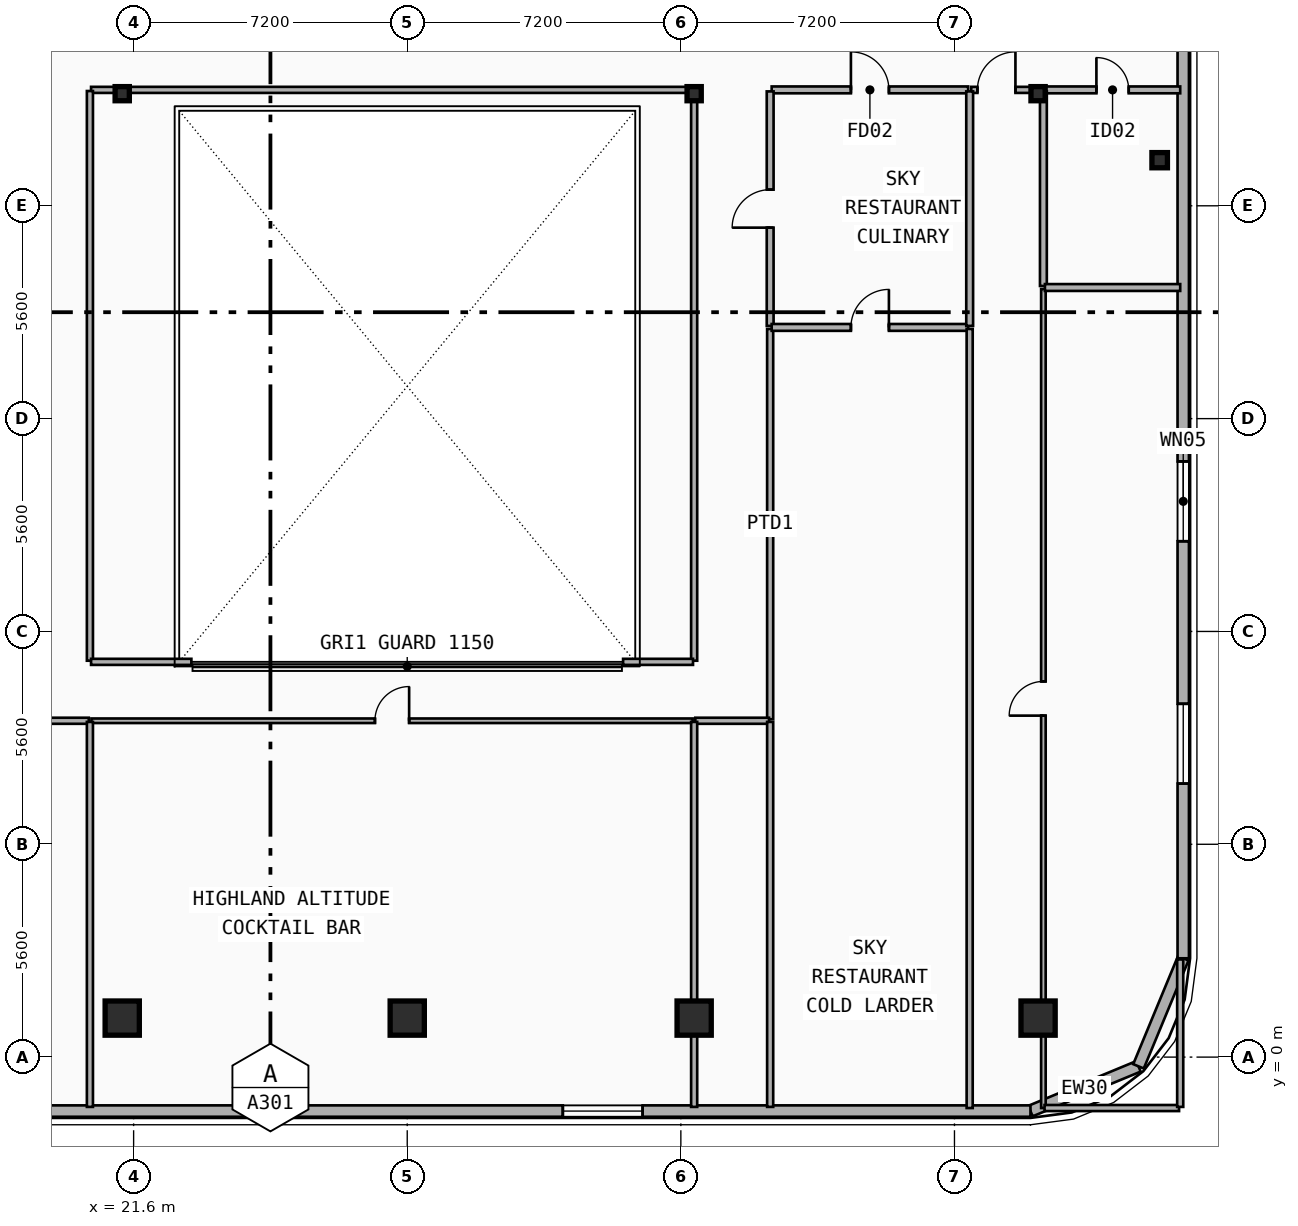
"""IFC4 building model, lengths in metres.
Left out: names, types, materials, properties, quantities, classifications, styles, units other than length and angle.
Written with IfcOpenShell. Run it as: python <this file> out.ifc"""

import sys

from ifc_helpers import new_model, si_unit, direction, frame, frame_2d, origin, origin_2d, place, context, subcontext, project, spatial, rectangle, i_section, extrude, element, fill, save


model = new_model("IFC4")
c1 = context("Model", 3, precision=1e-05, world=origin(), true_north=direction((0.0, 1.0)))
c2 = subcontext(c1, "Body", "Model", "MODEL_VIEW")
j1 = project(units=[si_unit("LENGTHUNIT", "METRE"), si_unit("PLANEANGLEUNIT", "RADIAN")], contexts=[c1])
p1 = place(None, origin())
s1 = spatial("IfcSite", under=j1, at=p1, CompositionType="ELEMENT")
p2 = place(p1, origin())
s2 = spatial("IfcBuilding", under=s1, at=p2, CompositionType="ELEMENT")
p3 = place(p2, frame((0.0, 0.0, 276.9)))
s3 = spatial("IfcBuildingStorey", under=s2, at=p3, CompositionType="ELEMENT", Elevation=276.9)
for number, where, z_axis, x_axis in (
    (1, (21.3, 25.35, 0.0), (0.0, 0.0, 1.0), (1.0, 0.0, 0.0)),
    (2, (36.35, 25.35, 0.0), (0.0, 0.0, 1.0), (1.0, 0.0, 0.0)),
    (3, (45.4, 25.35, 0.0), (0.0, 0.0, 1.0), (1.0, 0.0, 0.0)),
):
    element("IfcColumn", number, at=place(p3, frame(where, z_axis=z_axis, x_axis=x_axis)), inside=s3, PredefinedType="COLUMN", context=c2, shape_type="SweptSolid", body=[
        extrude(i_section(OverallWidth=0.374, OverallDepth=0.372, WebThickness=0.017, FlangeThickness=0.027, FilletRadius=0.015, at=origin_2d()), origin(), (0.0, 0.0, 1.0), 3.7),
    ])
for number, where, z_axis, x_axis in (
    (4, (21.3, 1.135, 0.0), (0.0, -0.09, 0.996), (1.0, 0.0, 0.0)),
    (5, (28.8, 1.135, 0.0), (0.0, -0.09, 0.996), (1.0, 0.0, 0.0)),
    (6, (36.35, 1.135, 0.0), (0.0, -0.09, 0.996), (1.0, 0.0, 0.0)),
    (7, (45.4, 1.135, 0.0), (0.0, -0.09, 0.996), (1.0, 0.0, 0.0)),
):
    element("IfcColumn", number, at=place(p3, frame(where, z_axis=z_axis, x_axis=x_axis)), inside=s3, PredefinedType="COLUMN", context=c2, shape_type="SweptSolid", body=[
        extrude(rectangle(XDim=0.9, YDim=0.9, at=origin_2d()), origin(), (0.0, 0.0, 1.0), 3.715),
    ])
p4 = place(p3, frame((48.6, 23.6, 0.0), z_axis=(0.0, 0.0, 1.0), x_axis=(1.0, 0.0, 0.0)))
e8 = element("IfcColumn", 8, at=p4, inside=s3, PredefinedType="COLUMN", context=c2, shape_type="SweptSolid", body=[
    extrude(i_section(OverallWidth=0.408, OverallDepth=0.4, WebThickness=0.025, FlangeThickness=0.039, FilletRadius=0.015, at=origin_2d()), origin(), (0.0, 0.0, 1.0), 3.7),
])
p5 = place(p3, frame((48.042, -0.243, 0.0), z_axis=(0.0, 0.0, 1.0), x_axis=(-0.92389884758, -0.382636798336, 0.0)))
e9 = element("IfcWall", 9, at=p5, inside=s3, PredefinedType="SOLIDWALL", context=c2, shape_type="SweptSolid", body=[
    extrude(rectangle(XDim=3.077, YDim=0.3, at=frame_2d((1.538, 0.0))), origin(), (0.0, 0.0, 1.0), 3.38),
])
p6 = place(p3, frame((49.22, 2.6, 0.0), z_axis=(0.0, 0.0, 1.0), x_axis=(-0.382676475685, -0.923882414032, 0.0)))
e10 = element("IfcWall", 10, at=p6, inside=s3, PredefinedType="SOLIDWALL", context=c2, shape_type="SweptSolid", body=[
    extrude(rectangle(XDim=3.077, YDim=0.3, at=frame_2d((1.539, 0.0))), origin(), (0.0, 0.0, 1.0), 3.38),
])
p7 = place(p3, frame((49.22, 36.8, 0.0), z_axis=(0.0, 0.0, 1.0), x_axis=(0.0, -1.0, 0.0)))
e11 = element("IfcWall", 11, at=p7, inside=s3, PredefinedType="SOLIDWALL", context=c2, shape_type="SweptSolid", body=[
    extrude(rectangle(XDim=34.2, YDim=0.3, at=frame_2d((17.1, 0.0))), origin(), (0.0, 0.0, 1.0), 3.38),
])
p8 = place(p7, frame((21.127, 0.0, 0.75)))
e12 = element("IfcOpeningElement", 12, at=p8, cuts=e11, PredefinedType="OPENING", context=c2, shape_type="SweptSolid", body=[
    extrude(rectangle(XDim=2.1, YDim=2.1, at=frame_2d((1.05, 1.05))), frame((0.0, 0.16, 0.0), z_axis=(0.0, -1.0, 0.0), x_axis=(1.0, 0.0, 0.0)), (0.0, 0.0, 1.0), 0.32),
])
p9 = place(p7, frame((27.503, 0.0, 0.75)))
e13 = element("IfcOpeningElement", 13, at=p9, cuts=e11, PredefinedType="OPENING", context=c2, shape_type="SweptSolid", body=[
    extrude(rectangle(XDim=2.1, YDim=2.1, at=frame_2d((1.05, 1.05))), frame((0.0, 0.16, 0.0), z_axis=(0.0, -1.0, 0.0), x_axis=(1.0, 0.0, 0.0)), (0.0, 0.0, 1.0), 0.32),
])
p10 = place(p3, frame((45.2, -1.42, 0.0), z_axis=(0.0, 0.0, 1.0), x_axis=(-1.0, 0.0, 0.0)))
e14 = element("IfcWall", 14, at=p10, inside=s3, PredefinedType="SOLIDWALL", context=c2, shape_type="SweptSolid", body=[
    extrude(rectangle(XDim=32.8, YDim=0.3, at=frame_2d((16.4, 0.0))), origin(), (0.0, 0.0, 1.0), 3.38),
])
p11 = place(p10, frame((30.68, 0.0, 0.34)))
e15 = element("IfcOpeningElement", 15, at=p11, cuts=e14, PredefinedType="OPENING", context=c2, shape_type="SweptSolid", body=[
    extrude(rectangle(XDim=1.8, YDim=1.8, at=frame_2d((0.9, 0.9))), frame((0.0, 0.16, 0.0), z_axis=(0.0, -1.0, 0.0), x_axis=(1.0, 0.0, 0.0)), (0.0, 0.0, 1.0), 0.32),
])
p12 = place(p10, frame((10.206, 0.0, 0.75)))
e16 = element("IfcOpeningElement", 16, at=p12, cuts=e14, PredefinedType="OPENING", context=c2, shape_type="SweptSolid", body=[
    extrude(rectangle(XDim=2.1, YDim=2.1, at=frame_2d((1.05, 1.05))), frame((0.0, 0.16, 0.0), z_axis=(0.0, -1.0, 0.0), x_axis=(1.0, 0.0, 0.0)), (0.0, 0.0, 1.0), 0.32),
])
p13 = place(p3, frame((38.39, 25.45, 0.0), z_axis=(0.0, 0.0, 1.0), x_axis=(1.0, 0.0, 0.0)))
e17 = element("IfcWall", 17, at=p13, inside=s3, PredefinedType="PLUMBINGWALL", context=c2, shape_type="SweptSolid", body=[
    extrude(rectangle(XDim=5.17, YDim=0.18, at=frame_2d((2.585, 0.0))), origin(), (0.0, 0.0, 1.0), 3.38),
])
p14 = place(p13, frame((2.085, 0.0, 0.0)))
e18 = element("IfcOpeningElement", 18, at=p14, cuts=e17, PredefinedType="OPENING", context=c2, shape_type="SweptSolid", body=[
    extrude(rectangle(XDim=1.0, YDim=2.15, at=frame_2d((0.5, 1.075))), frame((0.0, 0.1, 0.0), z_axis=(0.0, -1.0, 0.0), x_axis=(1.0, 0.0, 0.0)), (0.0, 0.0, 1.0), 0.2),
])
p15 = place(p3, frame((43.64, 25.45, 0.0), z_axis=(0.0, 0.0, 1.0), x_axis=(1.0, 0.0, 0.0)))
e19 = element("IfcWall", 19, at=p15, inside=s3, PredefinedType="PARTITIONING", context=c2, shape_type="SweptSolid", body=[
    extrude(rectangle(XDim=1.86, YDim=0.16, at=frame_2d((0.93, 0.0))), origin(), (0.0, 0.0, 1.0), 2.66),
])
p16 = place(p15, frame((0.164, 0.0, 0.0)))
e20 = element("IfcOpeningElement", 20, at=p16, cuts=e19, PredefinedType="OPENING", context=c2, shape_type="SweptSolid", body=[
    extrude(rectangle(XDim=1.0, YDim=2.15, at=frame_2d((0.5, 1.075))), frame((0.0, 0.09, 0.0), z_axis=(0.0, -1.0, 0.0), x_axis=(1.0, 0.0, 0.0)), (0.0, 0.0, 1.0), 0.18),
])
p17 = place(p3, frame((45.58, 25.45, 0.0), z_axis=(0.0, 0.0, 1.0), x_axis=(1.0, 0.0, 0.0)))
e21 = element("IfcWall", 21, at=p17, inside=s3, PredefinedType="PLUMBINGWALL", context=c2, shape_type="SweptSolid", body=[
    extrude(rectangle(XDim=3.56, YDim=0.18, at=frame_2d((1.78, 0.0))), origin(), (0.0, 0.0, 1.0), 2.66),
])
p18 = place(p17, frame((1.355, 0.0, 0.0)))
e22 = element("IfcOpeningElement", 22, at=p18, cuts=e21, PredefinedType="OPENING", context=c2, shape_type="SweptSolid", body=[
    extrude(rectangle(XDim=0.85, YDim=2.1, at=frame_2d((0.425, 1.05))), frame((0.0, 0.1, 0.0), z_axis=(0.0, -1.0, 0.0), x_axis=(1.0, 0.0, 0.0)), (0.0, 0.0, 1.0), 0.2),
])
p19 = place(p3, frame((38.35, 19.24, 0.0), z_axis=(0.0, 0.0, 1.0), x_axis=(0.0, 1.0, 0.0)))
e23 = element("IfcWall", 23, at=p19, inside=s3, PredefinedType="PLUMBINGWALL", context=c2, shape_type="SweptSolid", body=[
    extrude(rectangle(XDim=6.17, YDim=0.18, at=frame_2d((3.085, 0.0))), origin(), (0.0, 0.0, 1.0), 3.01),
])
p20 = place(p19, frame((2.585, 0.0, 0.0)))
e24 = element("IfcOpeningElement", 24, at=p20, cuts=e23, PredefinedType="OPENING", context=c2, shape_type="SweptSolid", body=[
    extrude(rectangle(XDim=1.0, YDim=2.15, at=frame_2d((0.5, 1.075))), frame((0.0, 0.1, 0.0), z_axis=(0.0, -1.0, 0.0), x_axis=(1.0, 0.0, 0.0)), (0.0, 0.0, 1.0), 0.2),
])
p21 = place(p3, frame((38.35, 8.89, 0.0), z_axis=(0.0, 0.0, 1.0), x_axis=(0.0, 1.0, 0.0)))
e25 = element("IfcWall", 25, at=p21, inside=s3, PredefinedType="PARTITIONING", context=c2, shape_type="SweptSolid", body=[
    extrude(rectangle(XDim=10.27, YDim=0.16, at=frame_2d((5.135, 0.0))), origin(), (0.0, 0.0, 1.0), 2.86),
])
p22 = place(p3, frame((20.49, 8.85, 0.0), z_axis=(0.0, 0.0, 1.0), x_axis=(1.0, 0.0, 0.0)))
e26 = element("IfcWall", 26, at=p22, inside=s3, PredefinedType="PARTITIONING", context=c2, shape_type="SweptSolid", body=[
    extrude(rectangle(XDim=15.82, YDim=0.12, at=frame_2d((7.91, 0.0))), origin(), (0.0, 0.0, 1.0), 2.66),
])
p23 = place(p22, frame((7.46, 0.0, 0.0)))
e27 = element("IfcOpeningElement", 27, at=p23, cuts=e26, PredefinedType="OPENING", context=c2, shape_type="SweptSolid", body=[
    extrude(rectangle(XDim=0.9, YDim=2.1, at=frame_2d((0.45, 1.05))), frame((0.0, 0.07, 0.0), z_axis=(0.0, -1.0, 0.0), x_axis=(1.0, 0.0, 0.0)), (0.0, 0.0, 1.0), 0.14),
])
p24 = place(p3, frame((38.39, 19.2, 0.0), z_axis=(0.0, 0.0, 1.0), x_axis=(1.0, 0.0, 0.0)))
e28 = element("IfcWall", 28, at=p24, inside=s3, PredefinedType="PLUMBINGWALL", context=c2, shape_type="SweptSolid", body=[
    extrude(rectangle(XDim=5.17, YDim=0.18, at=frame_2d((2.585, 0.0))), origin(), (0.0, 0.0, 1.0), 3.38),
])
p25 = place(p24, frame((2.085, 0.0, 0.0)))
e29 = element("IfcOpeningElement", 29, at=p25, cuts=e28, PredefinedType="OPENING", context=c2, shape_type="SweptSolid", body=[
    extrude(rectangle(XDim=1.0, YDim=2.15, at=frame_2d((0.5, 1.075))), frame((0.0, 0.1, 0.0), z_axis=(0.0, -1.0, 0.0), x_axis=(1.0, 0.0, 0.0)), (0.0, 0.0, 1.0), 0.2),
])
p26 = place(p3, frame((43.6, 19.24, 0.0), z_axis=(0.0, 0.0, 1.0), x_axis=(0.0, 1.0, 0.0)))
e30 = element("IfcWall", 30, at=p26, inside=s3, PredefinedType="PLUMBINGWALL", context=c2, shape_type="SweptSolid", body=[
    extrude(rectangle(XDim=6.17, YDim=0.18, at=frame_2d((3.085, 0.0))), origin(), (0.0, 0.0, 1.0), 3.01),
])
p27 = place(p3, frame((43.6, -1.34, 0.0), z_axis=(0.0, 0.0, 1.0), x_axis=(0.0, 1.0, 0.0)))
e31 = element("IfcWall", 31, at=p27, inside=s3, PredefinedType="PARTITIONING", context=c2, shape_type="SweptSolid", body=[
    extrude(rectangle(XDim=20.5, YDim=0.16, at=frame_2d((10.25, 0.0))), origin(), (0.0, 0.0, 1.0), 2.86),
])
p28 = place(p3, frame((45.54, -1.34, 0.0), z_axis=(0.0, 0.0, 1.0), x_axis=(0.0, 1.0, 0.0)))
e32 = element("IfcWall", 32, at=p28, inside=s3, PredefinedType="PARTITIONING", context=c2, shape_type="SweptSolid", body=[
    extrude(rectangle(XDim=21.55, YDim=0.12, at=frame_2d((10.775, 0.0))), origin(), (0.0, 0.0, 1.0), 2.66),
])
p29 = place(p28, frame((10.325, 0.0, 0.0)))
e33 = element("IfcOpeningElement", 33, at=p29, cuts=e32, PredefinedType="OPENING", context=c2, shape_type="SweptSolid", body=[
    extrude(rectangle(XDim=0.9, YDim=2.1, at=frame_2d((0.45, 1.05))), frame((0.0, 0.07, 0.0), z_axis=(0.0, -1.0, 0.0), x_axis=(1.0, 0.0, 0.0)), (0.0, 0.0, 1.0), 0.14),
])
p30 = place(p3, frame((45.54, 20.29, 0.0), z_axis=(0.0, 0.0, 1.0), x_axis=(0.0, 1.0, 0.0)))
e34 = element("IfcWall", 34, at=p30, inside=s3, PredefinedType="PLUMBINGWALL", context=c2, shape_type="SweptSolid", body=[
    extrude(rectangle(XDim=5.12, YDim=0.18, at=frame_2d((2.56, 0.0))), origin(), (0.0, 0.0, 1.0), 2.66),
])
p31 = place(p3, frame((45.58, 20.25, 0.0), z_axis=(0.0, 0.0, 1.0), x_axis=(1.0, 0.0, 0.0)))
e35 = element("IfcWall", 35, at=p31, inside=s3, PredefinedType="PLUMBINGWALL", context=c2, shape_type="SweptSolid", body=[
    extrude(rectangle(XDim=3.56, YDim=0.18, at=frame_2d((1.78, 0.0))), origin(), (0.0, 0.0, 1.0), 2.66),
])
p32 = place(p3, frame((20.48, 25.45, 0.0), z_axis=(0.0, 0.0, 1.0), x_axis=(1.0, 0.0, 0.0)))
e36 = element("IfcWall", 36, at=p32, inside=s3, PredefinedType="PARTITIONING", context=c2, shape_type="SweptSolid", body=[
    extrude(rectangle(XDim=15.84, YDim=0.16, at=frame_2d((7.92, 0.0))), origin(), (0.0, 0.0, 1.0), 2.66),
])
p33 = place(p3, frame((18.88, 8.85, 0.0), z_axis=(0.0, 0.0, 1.0), x_axis=(1.0, 0.0, 0.0)))
e37 = element("IfcWall", 37, at=p33, inside=s3, PredefinedType="PARTITIONING", context=c2, shape_type="SweptSolid", body=[
    extrude(rectangle(XDim=1.54, YDim=0.16, at=frame_2d((0.77, 0.0))), origin(), (0.0, 0.0, 1.0), 3.38),
])
p34 = place(p3, frame((20.45, 10.43, 0.0), z_axis=(0.0, 0.0, 1.0), x_axis=(0.0, 1.0, 0.0)))
e38 = element("IfcWall", 38, at=p34, inside=s3, PredefinedType="PARTITIONING", context=c2, shape_type="SweptSolid", body=[
    extrude(rectangle(XDim=14.99, YDim=0.16, at=frame_2d((7.495, 0.0))), origin(), (0.0, 0.0, 1.0), 2.86),
])
p35 = place(p3, frame((36.38, 8.85, 0.0), z_axis=(0.0, 0.0, 1.0), x_axis=(1.0, 0.0, 0.0)))
e39 = element("IfcWall", 39, at=p35, inside=s3, PredefinedType="PARTITIONING", context=c2, shape_type="SweptSolid", body=[
    extrude(rectangle(XDim=1.94, YDim=0.16, at=frame_2d((0.97, 0.0))), origin(), (0.0, 0.0, 1.0), 2.66),
])
p36 = place(p3, frame((36.35, 10.43, 0.0), z_axis=(0.0, 0.0, 1.0), x_axis=(0.0, 1.0, 0.0)))
e40 = element("IfcWall", 40, at=p36, inside=s3, PredefinedType="PARTITIONING", context=c2, shape_type="SweptSolid", body=[
    extrude(rectangle(XDim=14.99, YDim=0.16, at=frame_2d((7.495, 0.0))), origin(), (0.0, 0.0, 1.0), 2.66),
])
p37 = place(p3, frame((20.48, 10.4, 0.0), z_axis=(0.0, 0.0, 1.0), x_axis=(1.0, 0.0, 0.0)))
e41 = element("IfcWall", 41, at=p37, inside=s3, PredefinedType="PARTITIONING", context=c2, shape_type="SweptSolid", body=[
    extrude(rectangle(XDim=2.64, YDim=0.16, at=frame_2d((1.32, 0.0))), origin(), (0.0, 0.0, 1.0), 2.66),
])
p38 = place(p3, frame((34.48, 10.4, 0.0), z_axis=(0.0, 0.0, 1.0), x_axis=(1.0, 0.0, 0.0)))
e42 = element("IfcWall", 42, at=p38, inside=s3, PredefinedType="PARTITIONING", context=c2, shape_type="SweptSolid", body=[
    extrude(rectangle(XDim=1.84, YDim=0.16, at=frame_2d((0.92, 0.0))), origin(), (0.0, 0.0, 1.0), 2.66),
])
p39 = place(p3, frame((20.45, -1.31, 0.0), z_axis=(0.0, 0.0, 1.0), x_axis=(0.0, 1.0, 0.0)))
e43 = element("IfcWall", 43, at=p39, inside=s3, PredefinedType="PARTITIONING", context=c2, shape_type="SweptSolid", body=[
    extrude(rectangle(XDim=10.13, YDim=0.16, at=frame_2d((5.065, 0.0))), origin(), (0.0, 0.0, 1.0), 3.01),
])
p40 = place(p3, frame((36.35, -1.31, 0.0), z_axis=(0.0, 0.0, 1.0), x_axis=(0.0, 1.0, 0.0)))
e44 = element("IfcWall", 44, at=p40, inside=s3, PredefinedType="PARTITIONING", context=c2, shape_type="SweptSolid", body=[
    extrude(rectangle(XDim=10.13, YDim=0.16, at=frame_2d((5.065, 0.0))), origin(), (0.0, 0.0, 1.0), 2.66),
])
p41 = place(p3, frame((38.35, -1.31, 0.0), z_axis=(0.0, 0.0, 1.0), x_axis=(0.0, 1.0, 0.0)))
e45 = element("IfcWall", 45, at=p41, inside=s3, PredefinedType="PARTITIONING", context=c2, shape_type="SweptSolid", body=[
    extrude(rectangle(XDim=10.13, YDim=0.16, at=frame_2d((5.065, 0.0))), origin(), (0.0, 0.0, 1.0), 3.01),
])
p42 = place(p3, frame((45.57, -1.34, 0.0), z_axis=(0.0, 0.0, 1.0), x_axis=(1.0, 0.0, 0.0)))
e46 = element("IfcWall", 46, at=p42, inside=s3, PredefinedType="PARTITIONING", context=c2, shape_type="SweptSolid", body=[
    extrude(rectangle(XDim=3.54, YDim=0.16, at=frame_2d((1.77, 0.0))), origin(), (0.0, 0.0, 1.0), 3.38),
])
p43 = place(p3, frame((49.14, -1.31, 0.0), z_axis=(0.0, 0.0, 1.0), x_axis=(0.0, 1.0, 0.0)))
e47 = element("IfcWall", 47, at=p43, inside=s3, PredefinedType="PARTITIONING", context=c2, shape_type="SweptSolid", body=[
    extrude(rectangle(XDim=3.88, YDim=0.16, at=frame_2d((1.94, 0.0))), origin(), (0.0, 0.0, 1.0), 3.38),
])
p44 = place(p8, origin())
e48 = element("IfcWindow", 48, at=p44, inside=s3, PartitioningType="SINGLE_PANEL", PredefinedType="WINDOW", context=c2, shape_type="SweptSolid", body=[
    extrude(rectangle(XDim=2.1, YDim=2.1, at=frame_2d((1.05, 1.05))), frame((0.0, 0.03, 0.0), z_axis=(0.0, -1.0, 0.0), x_axis=(1.0, 0.0, 0.0)), (0.0, 0.0, 1.0), 0.06),
])
fill(e12, e48)
p45 = place(p9, origin())
e49 = element("IfcWindow", 49, at=p45, inside=s3, PartitioningType="SINGLE_PANEL", PredefinedType="WINDOW", context=c2, shape_type="SweptSolid", body=[
    extrude(rectangle(XDim=2.1, YDim=2.1, at=frame_2d((1.05, 1.05))), frame((0.0, 0.03, 0.0), z_axis=(0.0, -1.0, 0.0), x_axis=(1.0, 0.0, 0.0)), (0.0, 0.0, 1.0), 0.06),
])
fill(e13, e49)
p46 = place(p12, origin())
e50 = element("IfcWindow", 50, at=p46, inside=s3, PartitioningType="SINGLE_PANEL", PredefinedType="WINDOW", context=c2, shape_type="SweptSolid", body=[
    extrude(rectangle(XDim=2.1, YDim=2.1, at=frame_2d((1.05, 1.05))), frame((0.0, 0.03, 0.0), z_axis=(0.0, -1.0, 0.0), x_axis=(1.0, 0.0, 0.0)), (0.0, 0.0, 1.0), 0.06),
])
fill(e16, e50)
p47 = place(p14, origin())
e51 = element("IfcDoor", 51, at=p47, inside=s3, OperationType="SINGLE_SWING_LEFT", PredefinedType="DOOR", context=c2, shape_type="SweptSolid", body=[
    extrude(rectangle(XDim=1.0, YDim=2.15, at=frame_2d((0.5, 1.075))), frame((0.0, 0.025, 0.0), z_axis=(0.0, -1.0, 0.0), x_axis=(1.0, 0.0, 0.0)), (0.0, 0.0, 1.0), 0.05),
])
fill(e18, e51)
p48 = place(p16, origin())
e52 = element("IfcDoor", 52, at=p48, inside=s3, OperationType="SINGLE_SWING_RIGHT", PredefinedType="DOOR", context=c2, shape_type="SweptSolid", body=[
    extrude(rectangle(XDim=1.0, YDim=2.15, at=frame_2d((0.5, 1.075))), frame((0.0, 0.025, 0.0), z_axis=(0.0, -1.0, 0.0), x_axis=(1.0, 0.0, 0.0)), (0.0, 0.0, 1.0), 0.05),
])
fill(e20, e52)
p49 = place(p18, origin())
e53 = element("IfcDoor", 53, at=p49, inside=s3, OperationType="SINGLE_SWING_LEFT", PredefinedType="DOOR", context=c2, shape_type="SweptSolid", body=[
    extrude(rectangle(XDim=0.85, YDim=2.1, at=frame_2d((0.425, 1.05))), frame((0.0, 0.025, 0.0), z_axis=(0.0, -1.0, 0.0), x_axis=(1.0, 0.0, 0.0)), (0.0, 0.0, 1.0), 0.05),
])
fill(e22, e53)
p50 = place(p20, origin())
e54 = element("IfcDoor", 54, at=p50, inside=s3, OperationType="SINGLE_SWING_LEFT", PredefinedType="DOOR", context=c2, shape_type="SweptSolid", body=[
    extrude(rectangle(XDim=1.0, YDim=2.15, at=frame_2d((0.5, 1.075))), frame((0.0, 0.025, 0.0), z_axis=(0.0, -1.0, 0.0), x_axis=(1.0, 0.0, 0.0)), (0.0, 0.0, 1.0), 0.05),
])
fill(e24, e54)
p51 = place(p23, origin())
e55 = element("IfcDoor", 55, at=p51, inside=s3, OperationType="SINGLE_SWING_RIGHT", PredefinedType="DOOR", context=c2, shape_type="SweptSolid", body=[
    extrude(rectangle(XDim=0.9, YDim=2.1, at=frame_2d((0.45, 1.05))), frame((0.0, 0.025, 0.0), z_axis=(0.0, -1.0, 0.0), x_axis=(1.0, 0.0, 0.0)), (0.0, 0.0, 1.0), 0.05),
])
fill(e27, e55)
p52 = place(p25, origin())
e56 = element("IfcDoor", 56, at=p52, inside=s3, OperationType="SINGLE_SWING_RIGHT", PredefinedType="DOOR", context=c2, shape_type="SweptSolid", body=[
    extrude(rectangle(XDim=1.0, YDim=2.15, at=frame_2d((0.5, 1.075))), frame((0.0, 0.025, 0.0), z_axis=(0.0, -1.0, 0.0), x_axis=(1.0, 0.0, 0.0)), (0.0, 0.0, 1.0), 0.05),
])
fill(e29, e56)
p53 = place(p29, origin())
e57 = element("IfcDoor", 57, at=p53, inside=s3, OperationType="SINGLE_SWING_LEFT", PredefinedType="DOOR", context=c2, shape_type="SweptSolid", body=[
    extrude(rectangle(XDim=0.9, YDim=2.1, at=frame_2d((0.45, 1.05))), frame((0.0, 0.025, 0.0), z_axis=(0.0, -1.0, 0.0), x_axis=(1.0, 0.0, 0.0)), (0.0, 0.0, 1.0), 0.05),
])
fill(e33, e57)
save(model, sys.argv[1])
